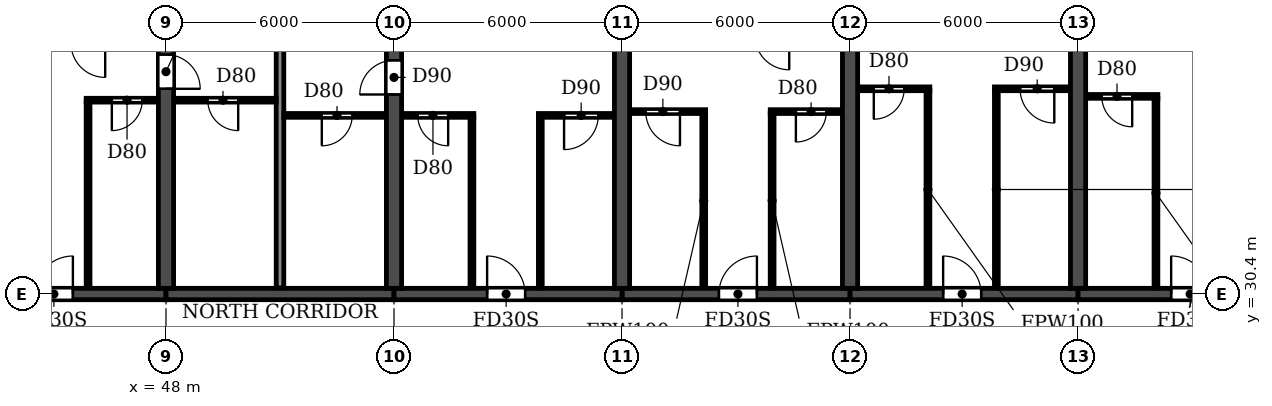
"""IFC4 building model, lengths in metres.
Left out: names, types, materials, properties, quantities, classifications, styles, units other than length and angle.
Written with IfcOpenShell. Run it as: python <this file> out.ifc"""

import sys

from ifc_helpers import new_model, si_unit, direction, frame, frame_2d, origin, place, context, subcontext, project, spatial, rectangle, extrude, element, fill, save


model = new_model("IFC4")
c1 = context("Model", 3, precision=1e-05, world=origin(), true_north=direction((0.0, 1.0)))
c2 = subcontext(c1, "Body", "Model", "MODEL_VIEW")
j1 = project(units=[si_unit("LENGTHUNIT", "METRE"), si_unit("PLANEANGLEUNIT", "RADIAN")], contexts=[c1])
p1 = place(None, origin())
s1 = spatial("IfcSite", under=j1, at=p1, CompositionType="ELEMENT")
p2 = place(p1, origin())
s2 = spatial("IfcBuilding", under=s1, at=p2, CompositionType="ELEMENT")
p3 = place(p2, frame((0.0, 0.0, 56.4)))
s3 = spatial("IfcBuildingStorey", under=s2, at=p3, CompositionType="ELEMENT", Elevation=56.4)
p4 = place(p3, frame((48.0, 30.55, 0.0), z_axis=(0.0, 0.0, 1.0), x_axis=(0.0, 1.0, 0.0)))
e1 = element("IfcWall", 1, at=p4, inside=s3, PredefinedType="SHEAR", context=c2, shape_type="SweptSolid", body=[
    extrude(rectangle(XDim=14.05, YDim=0.4, at=frame_2d((7.025, 0.0))), origin(), (0.0, 0.0, 1.0), 3.05),
])
p5 = place(p4, frame((5.25, 0.0, 0.0)))
e2 = element("IfcOpeningElement", 2, at=p5, cuts=e1, PredefinedType="OPENING", context=c2, shape_type="SweptSolid", body=[
    extrude(rectangle(XDim=0.9, YDim=2.1, at=frame_2d((0.45, 1.05))), frame((0.0, 0.21, 0.0), z_axis=(0.0, -1.0, 0.0), x_axis=(1.0, 0.0, 0.0)), (0.0, 0.0, 1.0), 0.42),
])
p6 = place(p3, frame((54.0, 30.55, 0.0), z_axis=(0.0, 0.0, 1.0), x_axis=(0.0, 1.0, 0.0)))
e3 = element("IfcWall", 3, at=p6, inside=s3, PredefinedType="SHEAR", context=c2, shape_type="SweptSolid", body=[
    extrude(rectangle(XDim=14.05, YDim=0.4, at=frame_2d((7.025, 0.0))), origin(), (0.0, 0.0, 1.0), 3.05),
])
p7 = place(p6, frame((5.1, 0.0, 0.0)))
e4 = element("IfcOpeningElement", 4, at=p7, cuts=e3, PredefinedType="OPENING", context=c2, shape_type="SweptSolid", body=[
    extrude(rectangle(XDim=0.9, YDim=2.1, at=frame_2d((0.45, 1.05))), frame((0.0, 0.21, 0.0), z_axis=(0.0, -1.0, 0.0), x_axis=(1.0, 0.0, 0.0)), (0.0, 0.0, 1.0), 0.42),
])
for number, where, z_axis, x_axis in (
    (5, (60.0, 30.55, 0.0), (0.0, 0.0, 1.0), (0.0, 1.0, 0.0)),
    (6, (66.0, 30.55, 0.0), (0.0, 0.0, 1.0), (0.0, 1.0, 0.0)),
    (7, (72.0, 30.55, 0.0), (0.0, 0.0, 1.0), (0.0, 1.0, 0.0)),
):
    element("IfcWall", number, at=place(p3, frame(where, z_axis=z_axis, x_axis=x_axis)), inside=s3, PredefinedType="SHEAR", context=c2, shape_type="SweptSolid", body=[
        extrude(rectangle(XDim=14.05, YDim=0.4, at=frame_2d((7.025, 0.0))), origin(), (0.0, 0.0, 1.0), 3.05),
    ])
p8 = place(p3, frame((42.0, 30.4, 0.0), z_axis=(0.0, 0.0, 1.0), x_axis=(1.0, 0.0, 0.0)))
e8 = element("IfcWall", 8, at=p8, inside=s3, PredefinedType="SHEAR", context=c2, shape_type="SweptSolid", body=[
    extrude(rectangle(XDim=6.0, YDim=0.3, at=frame_2d((3.0, 0.0))), origin(), (0.0, 0.0, 1.0), 2.45),
])
p9 = place(p8, frame((2.55, 0.0, 0.0)))
e9 = element("IfcOpeningElement", 9, at=p9, cuts=e8, PredefinedType="OPENING", context=c2, shape_type="SweptSolid", body=[
    extrude(rectangle(XDim=1.0, YDim=2.1, at=frame_2d((0.5, 1.05))), frame((0.0, 0.16, 0.0), z_axis=(0.0, -1.0, 0.0), x_axis=(1.0, 0.0, 0.0)), (0.0, 0.0, 1.0), 0.32),
])
p10 = place(p3, frame((48.0, 30.4, 0.0), z_axis=(0.0, 0.0, 1.0), x_axis=(1.0, 0.0, 0.0)))
e10 = element("IfcWall", 10, at=p10, inside=s3, PredefinedType="SHEAR", context=c2, shape_type="SweptSolid", body=[
    extrude(rectangle(XDim=6.0, YDim=0.3, at=frame_2d((3.0, 0.0))), origin(), (0.0, 0.0, 1.0), 2.45),
])
p11 = place(p3, frame((54.0, 30.4, 0.0), z_axis=(0.0, 0.0, 1.0), x_axis=(1.0, 0.0, 0.0)))
e11 = element("IfcWall", 11, at=p11, inside=s3, PredefinedType="SHEAR", context=c2, shape_type="SweptSolid", body=[
    extrude(rectangle(XDim=6.0, YDim=0.3, at=frame_2d((3.0, 0.0))), origin(), (0.0, 0.0, 1.0), 2.45),
])
p12 = place(p11, frame((2.45, 0.0, 0.0)))
e12 = element("IfcOpeningElement", 12, at=p12, cuts=e11, PredefinedType="OPENING", context=c2, shape_type="SweptSolid", body=[
    extrude(rectangle(XDim=1.0, YDim=2.1, at=frame_2d((0.5, 1.05))), frame((0.0, 0.16, 0.0), z_axis=(0.0, -1.0, 0.0), x_axis=(1.0, 0.0, 0.0)), (0.0, 0.0, 1.0), 0.32),
])
p13 = place(p3, frame((60.0, 30.4, 0.0), z_axis=(0.0, 0.0, 1.0), x_axis=(1.0, 0.0, 0.0)))
e13 = element("IfcWall", 13, at=p13, inside=s3, PredefinedType="SHEAR", context=c2, shape_type="SweptSolid", body=[
    extrude(rectangle(XDim=6.0, YDim=0.3, at=frame_2d((3.0, 0.0))), origin(), (0.0, 0.0, 1.0), 2.45),
])
p14 = place(p13, frame((2.55, 0.0, 0.0)))
e14 = element("IfcOpeningElement", 14, at=p14, cuts=e13, PredefinedType="OPENING", context=c2, shape_type="SweptSolid", body=[
    extrude(rectangle(XDim=1.0, YDim=2.1, at=frame_2d((0.5, 1.05))), frame((0.0, 0.16, 0.0), z_axis=(0.0, -1.0, 0.0), x_axis=(1.0, 0.0, 0.0)), (0.0, 0.0, 1.0), 0.32),
])
p15 = place(p3, frame((66.0, 30.4, 0.0), z_axis=(0.0, 0.0, 1.0), x_axis=(1.0, 0.0, 0.0)))
e15 = element("IfcWall", 15, at=p15, inside=s3, PredefinedType="SHEAR", context=c2, shape_type="SweptSolid", body=[
    extrude(rectangle(XDim=6.0, YDim=0.3, at=frame_2d((3.0, 0.0))), origin(), (0.0, 0.0, 1.0), 2.45),
])
p16 = place(p15, frame((2.45, 0.0, 0.0)))
e16 = element("IfcOpeningElement", 16, at=p16, cuts=e15, PredefinedType="OPENING", context=c2, shape_type="SweptSolid", body=[
    extrude(rectangle(XDim=1.0, YDim=2.1, at=frame_2d((0.5, 1.05))), frame((0.0, 0.16, 0.0), z_axis=(0.0, -1.0, 0.0), x_axis=(1.0, 0.0, 0.0)), (0.0, 0.0, 1.0), 0.32),
])
p17 = place(p3, frame((72.0, 30.4, 0.0), z_axis=(0.0, 0.0, 1.0), x_axis=(1.0, 0.0, 0.0)))
e17 = element("IfcWall", 17, at=p17, inside=s3, PredefinedType="SHEAR", context=c2, shape_type="SweptSolid", body=[
    extrude(rectangle(XDim=6.0, YDim=0.3, at=frame_2d((3.0, 0.0))), origin(), (0.0, 0.0, 1.0), 2.45),
])
p18 = place(p17, frame((2.45, 0.0, 0.0)))
e18 = element("IfcOpeningElement", 18, at=p18, cuts=e17, PredefinedType="OPENING", context=c2, shape_type="SweptSolid", body=[
    extrude(rectangle(XDim=1.0, YDim=2.1, at=frame_2d((0.5, 1.05))), frame((0.0, 0.16, 0.0), z_axis=(0.0, -1.0, 0.0), x_axis=(1.0, 0.0, 0.0)), (0.0, 0.0, 1.0), 0.32),
])
p19 = place(p3, frame((51.0, 30.56, 0.0), z_axis=(0.0, 0.0, 1.0), x_axis=(0.0, 1.0, 0.0)))
e19 = element("IfcWall", 19, at=p19, inside=s3, PredefinedType="PARTITIONING", context=c2, shape_type="SweptSolid", body=[
    extrude(rectangle(XDim=14.18, YDim=0.2, at=frame_2d((7.09, 0.0))), origin(), (0.0, 0.0, 1.0), 3.05),
])
p20 = place(p3, frame((51.1, 35.1, 0.0), z_axis=(0.0, 0.0, 1.0), x_axis=(1.0, 0.0, 0.0)))
e20 = element("IfcWall", 20, at=p20, inside=s3, PredefinedType="PARTITIONING", context=c2, shape_type="SweptSolid", body=[
    extrude(rectangle(XDim=2.69, YDim=0.1, at=frame_2d((1.345, 0.0))), origin(), (0.0, 0.0, 1.0), 3.05),
])
p21 = place(p20, frame((1.0, 0.0, 0.0)))
e21 = element("IfcOpeningElement", 21, at=p21, cuts=e20, PredefinedType="OPENING", context=c2, shape_type="SweptSolid", body=[
    extrude(rectangle(XDim=0.8, YDim=2.1, at=frame_2d((0.4, 1.05))), frame((0.0, 0.06, 0.0), z_axis=(0.0, -1.0, 0.0), x_axis=(1.0, 0.0, 0.0)), (0.0, 0.0, 1.0), 0.12),
])
p22 = place(p3, frame((54.21, 35.1, 0.0), z_axis=(0.0, 0.0, 1.0), x_axis=(1.0, 0.0, 0.0)))
e22 = element("IfcWall", 22, at=p22, inside=s3, PredefinedType="PARTITIONING", context=c2, shape_type="SweptSolid", body=[
    extrude(rectangle(XDim=1.89, YDim=0.1, at=frame_2d((0.945, 0.0))), origin(), (0.0, 0.0, 1.0), 3.05),
])
p23 = place(p22, frame((0.415, 0.0, 0.0)))
e23 = element("IfcOpeningElement", 23, at=p23, cuts=e22, PredefinedType="OPENING", context=c2, shape_type="SweptSolid", body=[
    extrude(rectangle(XDim=0.8, YDim=2.1, at=frame_2d((0.4, 1.05))), frame((0.0, 0.06, 0.0), z_axis=(0.0, -1.0, 0.0), x_axis=(1.0, 0.0, 0.0)), (0.0, 0.0, 1.0), 0.12),
])
p24 = place(p3, frame((57.8, 35.1, 0.0), z_axis=(0.0, 0.0, 1.0), x_axis=(1.0, 0.0, 0.0)))
e24 = element("IfcWall", 24, at=p24, inside=s3, PredefinedType="PARTITIONING", context=c2, shape_type="SweptSolid", body=[
    extrude(rectangle(XDim=1.99, YDim=0.1, at=frame_2d((0.995, 0.0))), origin(), (0.0, 0.0, 1.0), 3.05),
])
p25 = place(p24, frame((0.675, 0.0, 0.0)))
e25 = element("IfcOpeningElement", 25, at=p25, cuts=e24, PredefinedType="OPENING", context=c2, shape_type="SweptSolid", body=[
    extrude(rectangle(XDim=0.9, YDim=2.1, at=frame_2d((0.45, 1.05))), frame((0.0, 0.06, 0.0), z_axis=(0.0, -1.0, 0.0), x_axis=(1.0, 0.0, 0.0)), (0.0, 0.0, 1.0), 0.12),
])
p26 = place(p3, frame((60.21, 35.2, 0.0), z_axis=(0.0, 0.0, 1.0), x_axis=(1.0, 0.0, 0.0)))
e26 = element("IfcWall", 26, at=p26, inside=s3, PredefinedType="PARTITIONING", context=c2, shape_type="SweptSolid", body=[
    extrude(rectangle(XDim=1.99, YDim=0.1, at=frame_2d((0.995, 0.0))), origin(), (0.0, 0.0, 1.0), 3.05),
])
p27 = place(p26, frame((0.415, 0.0, 0.0)))
e27 = element("IfcOpeningElement", 27, at=p27, cuts=e26, PredefinedType="OPENING", context=c2, shape_type="SweptSolid", body=[
    extrude(rectangle(XDim=0.9, YDim=2.1, at=frame_2d((0.45, 1.05))), frame((0.0, 0.06, 0.0), z_axis=(0.0, -1.0, 0.0), x_axis=(1.0, 0.0, 0.0)), (0.0, 0.0, 1.0), 0.12),
])
p28 = place(p3, frame((63.9, 35.2, 0.0), z_axis=(0.0, 0.0, 1.0), x_axis=(1.0, 0.0, 0.0)))
e28 = element("IfcWall", 28, at=p28, inside=s3, PredefinedType="PARTITIONING", context=c2, shape_type="SweptSolid", body=[
    extrude(rectangle(XDim=1.89, YDim=0.1, at=frame_2d((0.945, 0.0))), origin(), (0.0, 0.0, 1.0), 3.05),
])
p29 = place(p28, frame((0.675, 0.0, 0.0)))
e29 = element("IfcOpeningElement", 29, at=p29, cuts=e28, PredefinedType="OPENING", context=c2, shape_type="SweptSolid", body=[
    extrude(rectangle(XDim=0.8, YDim=2.1, at=frame_2d((0.4, 1.05))), frame((0.0, 0.06, 0.0), z_axis=(0.0, -1.0, 0.0), x_axis=(1.0, 0.0, 0.0)), (0.0, 0.0, 1.0), 0.12),
])
p30 = place(p3, frame((45.9, 35.5, 0.0), z_axis=(0.0, 0.0, 1.0), x_axis=(1.0, 0.0, 0.0)))
e30 = element("IfcWall", 30, at=p30, inside=s3, PredefinedType="PARTITIONING", context=c2, shape_type="SweptSolid", body=[
    extrude(rectangle(XDim=1.89, YDim=0.1, at=frame_2d((0.945, 0.0))), origin(), (0.0, 0.0, 1.0), 3.05),
])
p31 = place(p30, frame((0.675, 0.0, 0.0)))
e31 = element("IfcOpeningElement", 31, at=p31, cuts=e30, PredefinedType="OPENING", context=c2, shape_type="SweptSolid", body=[
    extrude(rectangle(XDim=0.8, YDim=2.1, at=frame_2d((0.4, 1.05))), frame((0.0, 0.06, 0.0), z_axis=(0.0, -1.0, 0.0), x_axis=(1.0, 0.0, 0.0)), (0.0, 0.0, 1.0), 0.12),
])
p32 = place(p3, frame((48.21, 35.5, 0.0), z_axis=(0.0, 0.0, 1.0), x_axis=(1.0, 0.0, 0.0)))
e32 = element("IfcWall", 32, at=p32, inside=s3, PredefinedType="PARTITIONING", context=c2, shape_type="SweptSolid", body=[
    extrude(rectangle(XDim=2.69, YDim=0.1, at=frame_2d((1.345, 0.0))), origin(), (0.0, 0.0, 1.0), 3.05),
])
p33 = place(p32, frame((0.89, 0.0, 0.0)))
e33 = element("IfcOpeningElement", 33, at=p33, cuts=e32, PredefinedType="OPENING", context=c2, shape_type="SweptSolid", body=[
    extrude(rectangle(XDim=0.8, YDim=2.1, at=frame_2d((0.4, 1.05))), frame((0.0, 0.06, 0.0), z_axis=(0.0, -1.0, 0.0), x_axis=(1.0, 0.0, 0.0)), (0.0, 0.0, 1.0), 0.12),
])
p34 = place(p3, frame((72.21, 35.6, 0.0), z_axis=(0.0, 0.0, 1.0), x_axis=(1.0, 0.0, 0.0)))
e34 = element("IfcWall", 34, at=p34, inside=s3, PredefinedType="PARTITIONING", context=c2, shape_type="SweptSolid", body=[
    extrude(rectangle(XDim=1.89, YDim=0.1, at=frame_2d((0.945, 0.0))), origin(), (0.0, 0.0, 1.0), 3.05),
])
p35 = place(p34, frame((0.415, 0.0, 0.0)))
e35 = element("IfcOpeningElement", 35, at=p35, cuts=e34, PredefinedType="OPENING", context=c2, shape_type="SweptSolid", body=[
    extrude(rectangle(XDim=0.8, YDim=2.1, at=frame_2d((0.4, 1.05))), frame((0.0, 0.06, 0.0), z_axis=(0.0, -1.0, 0.0), x_axis=(1.0, 0.0, 0.0)), (0.0, 0.0, 1.0), 0.12),
])
p36 = place(p3, frame((66.21, 35.8, 0.0), z_axis=(0.0, 0.0, 1.0), x_axis=(1.0, 0.0, 0.0)))
e36 = element("IfcWall", 36, at=p36, inside=s3, PredefinedType="PARTITIONING", context=c2, shape_type="SweptSolid", body=[
    extrude(rectangle(XDim=1.89, YDim=0.1, at=frame_2d((0.945, 0.0))), origin(), (0.0, 0.0, 1.0), 3.05),
])
p37 = place(p36, frame((0.415, 0.0, 0.0)))
e37 = element("IfcOpeningElement", 37, at=p37, cuts=e36, PredefinedType="OPENING", context=c2, shape_type="SweptSolid", body=[
    extrude(rectangle(XDim=0.8, YDim=2.1, at=frame_2d((0.4, 1.05))), frame((0.0, 0.06, 0.0), z_axis=(0.0, -1.0, 0.0), x_axis=(1.0, 0.0, 0.0)), (0.0, 0.0, 1.0), 0.12),
])
p38 = place(p3, frame((69.8, 35.8, 0.0), z_axis=(0.0, 0.0, 1.0), x_axis=(1.0, 0.0, 0.0)))
e38 = element("IfcWall", 38, at=p38, inside=s3, PredefinedType="PARTITIONING", context=c2, shape_type="SweptSolid", body=[
    extrude(rectangle(XDim=1.99, YDim=0.1, at=frame_2d((0.995, 0.0))), origin(), (0.0, 0.0, 1.0), 3.05),
])
p39 = place(p38, frame((0.675, 0.0, 0.0)))
e39 = element("IfcOpeningElement", 39, at=p39, cuts=e38, PredefinedType="OPENING", context=c2, shape_type="SweptSolid", body=[
    extrude(rectangle(XDim=0.9, YDim=2.1, at=frame_2d((0.45, 1.05))), frame((0.0, 0.06, 0.0), z_axis=(0.0, -1.0, 0.0), x_axis=(1.0, 0.0, 0.0)), (0.0, 0.0, 1.0), 0.12),
])
p40 = place(p3, frame((45.95, 30.56, 0.0), z_axis=(0.0, 0.0, 1.0), x_axis=(0.0, 1.0, 0.0)))
e40 = element("IfcWall", 40, at=p40, inside=s3, PredefinedType="PARTITIONING", context=c2, shape_type="SweptSolid", body=[
    extrude(rectangle(XDim=4.89, YDim=0.1, at=frame_2d((2.445, 0.0))), origin(), (0.0, 0.0, 1.0), 3.05),
])
for number, where, z_axis, x_axis in (
    (41, (56.05, 30.56, 0.0), (0.0, 0.0, 1.0), (0.0, 1.0, 0.0)),
    (42, (57.85, 30.56, 0.0), (0.0, 0.0, 1.0), (0.0, 1.0, 0.0)),
):
    element("IfcWall", number, at=place(p3, frame(where, z_axis=z_axis, x_axis=x_axis)), inside=s3, PredefinedType="PARTITIONING", context=c2, shape_type="SweptSolid", body=[
        extrude(rectangle(XDim=4.49, YDim=0.1, at=frame_2d((2.245, 0.0))), origin(), (0.0, 0.0, 1.0), 3.05),
    ])
for number, where, z_axis, x_axis in (
    (43, (62.15, 30.56, 0.0), (0.0, 0.0, 1.0), (0.0, 1.0, 0.0)),
    (44, (63.95, 30.56, 0.0), (0.0, 0.0, 1.0), (0.0, 1.0, 0.0)),
):
    element("IfcWall", number, at=place(p3, frame(where, z_axis=z_axis, x_axis=x_axis)), inside=s3, PredefinedType="PARTITIONING", context=c2, shape_type="SweptSolid", body=[
        extrude(rectangle(XDim=4.59, YDim=0.1, at=frame_2d((2.295, 0.0))), origin(), (0.0, 0.0, 1.0), 3.05),
    ])
for number, where, z_axis, x_axis in (
    (45, (68.05, 30.56, 0.0), (0.0, 0.0, 1.0), (0.0, 1.0, 0.0)),
    (46, (69.85, 30.56, 0.0), (0.0, 0.0, 1.0), (0.0, 1.0, 0.0)),
):
    element("IfcWall", number, at=place(p3, frame(where, z_axis=z_axis, x_axis=x_axis)), inside=s3, PredefinedType="PARTITIONING", context=c2, shape_type="SweptSolid", body=[
        extrude(rectangle(XDim=5.19, YDim=0.1, at=frame_2d((2.595, 0.0))), origin(), (0.0, 0.0, 1.0), 3.05),
    ])
p41 = place(p3, frame((74.05, 30.56, 0.0), z_axis=(0.0, 0.0, 1.0), x_axis=(0.0, 1.0, 0.0)))
e47 = element("IfcWall", 47, at=p41, inside=s3, PredefinedType="PARTITIONING", context=c2, shape_type="SweptSolid", body=[
    extrude(rectangle(XDim=4.99, YDim=0.1, at=frame_2d((2.495, 0.0))), origin(), (0.0, 0.0, 1.0), 3.05),
])
p42 = place(p33, frame((0.8, 0.0, 0.0), z_axis=(0.0, 0.0, 1.0), x_axis=(-1.0, 0.0, 0.0)))
e48 = element("IfcDoor", 48, at=p42, inside=s3, OperationType="SINGLE_SWING_LEFT", PredefinedType="DOOR", context=c2, shape_type="SweptSolid", body=[
    extrude(rectangle(XDim=0.8, YDim=2.1, at=frame_2d((0.4, 1.05))), frame((0.0, 0.025, 0.0), z_axis=(0.0, -1.0, 0.0), x_axis=(1.0, 0.0, 0.0)), (0.0, 0.0, 1.0), 0.05),
])
fill(e33, e48)
p43 = place(p9, origin())
e49 = element("IfcDoor", 49, at=p43, inside=s3, OperationType="SINGLE_SWING_RIGHT", PredefinedType="DOOR", context=c2, shape_type="SweptSolid", body=[
    extrude(rectangle(XDim=1.0, YDim=2.1, at=frame_2d((0.5, 1.05))), frame((0.0, 0.025, 0.0), z_axis=(0.0, -1.0, 0.0), x_axis=(1.0, 0.0, 0.0)), (0.0, 0.0, 1.0), 0.05),
])
fill(e9, e49)
p44 = place(p31, frame((0.8, 0.0, 0.0), z_axis=(0.0, 0.0, 1.0), x_axis=(-1.0, 0.0, 0.0)))
e50 = element("IfcDoor", 50, at=p44, inside=s3, OperationType="SINGLE_SWING_RIGHT", PredefinedType="DOOR", context=c2, shape_type="SweptSolid", body=[
    extrude(rectangle(XDim=0.8, YDim=2.1, at=frame_2d((0.4, 1.05))), frame((0.0, 0.025, 0.0), z_axis=(0.0, -1.0, 0.0), x_axis=(1.0, 0.0, 0.0)), (0.0, 0.0, 1.0), 0.05),
])
fill(e31, e50)
p45 = place(p5, frame((0.9, 0.0, 0.0), z_axis=(0.0, 0.0, 1.0), x_axis=(-1.0, 0.0, 0.0)))
e51 = element("IfcDoor", 51, at=p45, inside=s3, OperationType="SINGLE_SWING_RIGHT", PredefinedType="DOOR", context=c2, shape_type="SweptSolid", body=[
    extrude(rectangle(XDim=0.9, YDim=2.1, at=frame_2d((0.45, 1.05))), frame((0.0, 0.025, 0.0), z_axis=(0.0, -1.0, 0.0), x_axis=(1.0, 0.0, 0.0)), (0.0, 0.0, 1.0), 0.05),
])
fill(e2, e51)
p46 = place(p21, frame((0.8, 0.0, 0.0), z_axis=(0.0, 0.0, 1.0), x_axis=(-1.0, 0.0, 0.0)))
e52 = element("IfcDoor", 52, at=p46, inside=s3, OperationType="SINGLE_SWING_RIGHT", PredefinedType="DOOR", context=c2, shape_type="SweptSolid", body=[
    extrude(rectangle(XDim=0.8, YDim=2.1, at=frame_2d((0.4, 1.05))), frame((0.0, 0.025, 0.0), z_axis=(0.0, -1.0, 0.0), x_axis=(1.0, 0.0, 0.0)), (0.0, 0.0, 1.0), 0.05),
])
fill(e21, e52)
p47 = place(p7, origin())
e53 = element("IfcDoor", 53, at=p47, inside=s3, OperationType="SINGLE_SWING_LEFT", PredefinedType="DOOR", context=c2, shape_type="SweptSolid", body=[
    extrude(rectangle(XDim=0.9, YDim=2.1, at=frame_2d((0.45, 1.05))), frame((0.0, 0.025, 0.0), z_axis=(0.0, -1.0, 0.0), x_axis=(1.0, 0.0, 0.0)), (0.0, 0.0, 1.0), 0.05),
])
fill(e4, e53)
p48 = place(p23, frame((0.8, 0.0, 0.0), z_axis=(0.0, 0.0, 1.0), x_axis=(-1.0, 0.0, 0.0)))
e54 = element("IfcDoor", 54, at=p48, inside=s3, OperationType="SINGLE_SWING_LEFT", PredefinedType="DOOR", context=c2, shape_type="SweptSolid", body=[
    extrude(rectangle(XDim=0.8, YDim=2.1, at=frame_2d((0.4, 1.05))), frame((0.0, 0.025, 0.0), z_axis=(0.0, -1.0, 0.0), x_axis=(1.0, 0.0, 0.0)), (0.0, 0.0, 1.0), 0.05),
])
fill(e23, e54)
p49 = place(p12, origin())
e55 = element("IfcDoor", 55, at=p49, inside=s3, OperationType="SINGLE_SWING_LEFT", PredefinedType="DOOR", context=c2, shape_type="SweptSolid", body=[
    extrude(rectangle(XDim=1.0, YDim=2.1, at=frame_2d((0.5, 1.05))), frame((0.0, 0.025, 0.0), z_axis=(0.0, -1.0, 0.0), x_axis=(1.0, 0.0, 0.0)), (0.0, 0.0, 1.0), 0.05),
])
fill(e12, e55)
p50 = place(p25, frame((0.9, 0.0, 0.0), z_axis=(0.0, 0.0, 1.0), x_axis=(-1.0, 0.0, 0.0)))
e56 = element("IfcDoor", 56, at=p50, inside=s3, OperationType="SINGLE_SWING_RIGHT", PredefinedType="DOOR", context=c2, shape_type="SweptSolid", body=[
    extrude(rectangle(XDim=0.9, YDim=2.1, at=frame_2d((0.45, 1.05))), frame((0.0, 0.025, 0.0), z_axis=(0.0, -1.0, 0.0), x_axis=(1.0, 0.0, 0.0)), (0.0, 0.0, 1.0), 0.05),
])
fill(e25, e56)
p51 = place(p27, frame((0.9, 0.0, 0.0), z_axis=(0.0, 0.0, 1.0), x_axis=(-1.0, 0.0, 0.0)))
e57 = element("IfcDoor", 57, at=p51, inside=s3, OperationType="SINGLE_SWING_LEFT", PredefinedType="DOOR", context=c2, shape_type="SweptSolid", body=[
    extrude(rectangle(XDim=0.9, YDim=2.1, at=frame_2d((0.45, 1.05))), frame((0.0, 0.025, 0.0), z_axis=(0.0, -1.0, 0.0), x_axis=(1.0, 0.0, 0.0)), (0.0, 0.0, 1.0), 0.05),
])
fill(e27, e57)
p52 = place(p14, origin())
e58 = element("IfcDoor", 58, at=p52, inside=s3, OperationType="SINGLE_SWING_RIGHT", PredefinedType="DOOR", context=c2, shape_type="SweptSolid", body=[
    extrude(rectangle(XDim=1.0, YDim=2.1, at=frame_2d((0.5, 1.05))), frame((0.0, 0.025, 0.0), z_axis=(0.0, -1.0, 0.0), x_axis=(1.0, 0.0, 0.0)), (0.0, 0.0, 1.0), 0.05),
])
fill(e14, e58)
p53 = place(p29, frame((0.8, 0.0, 0.0), z_axis=(0.0, 0.0, 1.0), x_axis=(-1.0, 0.0, 0.0)))
e59 = element("IfcDoor", 59, at=p53, inside=s3, OperationType="SINGLE_SWING_RIGHT", PredefinedType="DOOR", context=c2, shape_type="SweptSolid", body=[
    extrude(rectangle(XDim=0.8, YDim=2.1, at=frame_2d((0.4, 1.05))), frame((0.0, 0.025, 0.0), z_axis=(0.0, -1.0, 0.0), x_axis=(1.0, 0.0, 0.0)), (0.0, 0.0, 1.0), 0.05),
])
fill(e29, e59)
p54 = place(p37, frame((0.8, 0.0, 0.0), z_axis=(0.0, 0.0, 1.0), x_axis=(-1.0, 0.0, 0.0)))
e60 = element("IfcDoor", 60, at=p54, inside=s3, OperationType="SINGLE_SWING_RIGHT", PredefinedType="DOOR", context=c2, shape_type="SweptSolid", body=[
    extrude(rectangle(XDim=0.8, YDim=2.1, at=frame_2d((0.4, 1.05))), frame((0.0, 0.025, 0.0), z_axis=(0.0, -1.0, 0.0), x_axis=(1.0, 0.0, 0.0)), (0.0, 0.0, 1.0), 0.05),
])
fill(e37, e60)
p55 = place(p16, origin())
e61 = element("IfcDoor", 61, at=p55, inside=s3, OperationType="SINGLE_SWING_LEFT", PredefinedType="DOOR", context=c2, shape_type="SweptSolid", body=[
    extrude(rectangle(XDim=1.0, YDim=2.1, at=frame_2d((0.5, 1.05))), frame((0.0, 0.025, 0.0), z_axis=(0.0, -1.0, 0.0), x_axis=(1.0, 0.0, 0.0)), (0.0, 0.0, 1.0), 0.05),
])
fill(e16, e61)
p56 = place(p39, frame((0.9, 0.0, 0.0), z_axis=(0.0, 0.0, 1.0), x_axis=(-1.0, 0.0, 0.0)))
e62 = element("IfcDoor", 62, at=p56, inside=s3, OperationType="SINGLE_SWING_LEFT", PredefinedType="DOOR", context=c2, shape_type="SweptSolid", body=[
    extrude(rectangle(XDim=0.9, YDim=2.1, at=frame_2d((0.45, 1.05))), frame((0.0, 0.025, 0.0), z_axis=(0.0, -1.0, 0.0), x_axis=(1.0, 0.0, 0.0)), (0.0, 0.0, 1.0), 0.05),
])
fill(e39, e62)
p57 = place(p35, frame((0.8, 0.0, 0.0), z_axis=(0.0, 0.0, 1.0), x_axis=(-1.0, 0.0, 0.0)))
e63 = element("IfcDoor", 63, at=p57, inside=s3, OperationType="SINGLE_SWING_LEFT", PredefinedType="DOOR", context=c2, shape_type="SweptSolid", body=[
    extrude(rectangle(XDim=0.8, YDim=2.1, at=frame_2d((0.4, 1.05))), frame((0.0, 0.025, 0.0), z_axis=(0.0, -1.0, 0.0), x_axis=(1.0, 0.0, 0.0)), (0.0, 0.0, 1.0), 0.05),
])
fill(e35, e63)
p58 = place(p18, origin())
e64 = element("IfcDoor", 64, at=p58, inside=s3, OperationType="SINGLE_SWING_LEFT", PredefinedType="DOOR", context=c2, shape_type="SweptSolid", body=[
    extrude(rectangle(XDim=1.0, YDim=2.1, at=frame_2d((0.5, 1.05))), frame((0.0, 0.025, 0.0), z_axis=(0.0, -1.0, 0.0), x_axis=(1.0, 0.0, 0.0)), (0.0, 0.0, 1.0), 0.05),
])
fill(e18, e64)
save(model, sys.argv[1])
